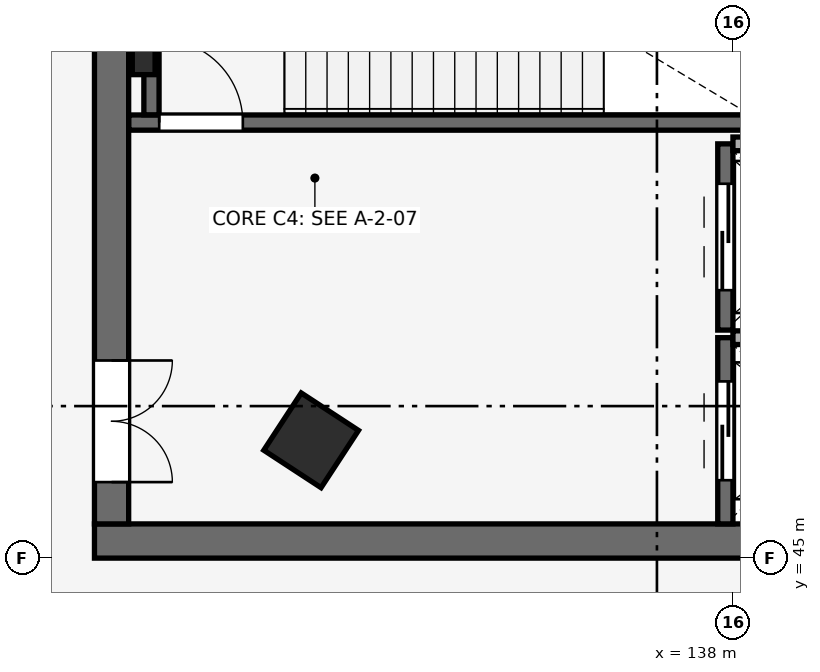
"""IFC4 building model, lengths in metres.
Left out: names, types, materials, properties, quantities, classifications, styles, units other than length and angle.
Written with IfcOpenShell. Run it as: python <this file> out.ifc"""

import sys

from ifc_helpers import new_model, si_unit, direction, frame, frame_2d, origin, origin_2d, place, context, subcontext, project, spatial, rectangle, i_section, extrude, element, fill, save


model = new_model("IFC4")
c1 = context("Model", 3, precision=1e-05, world=origin(), true_north=direction((0.0, 1.0)))
c2 = subcontext(c1, "Body", "Model", "MODEL_VIEW")
j1 = project(units=[si_unit("LENGTHUNIT", "METRE"), si_unit("PLANEANGLEUNIT", "RADIAN")], contexts=[c1])
p1 = place(None, origin())
s1 = spatial("IfcSite", under=j1, at=p1, CompositionType="ELEMENT")
p2 = place(p1, origin())
s2 = spatial("IfcBuilding", under=s1, at=p2, CompositionType="ELEMENT")
p3 = place(p2, origin())
s3 = spatial("IfcBuildingStorey", under=s2, at=p3, CompositionType="ELEMENT", Elevation=0.0)
p4 = place(p3, frame((132.451, 46.55, 0.0), z_axis=(0.0, 0.0, 1.0), x_axis=(0.836955398099, -0.547271104292, 0.0)))
e1 = element("IfcColumn", 1, at=p4, inside=s3, PredefinedType="COLUMN", context=c2, shape_type="SweptSolid", body=[
    extrude(rectangle(XDim=0.9, YDim=0.9, at=origin_2d()), origin(), (0.0, 0.0, 1.0), 5.4),
])
p5 = place(p3, frame((129.6, 45.225, 0.0), z_axis=(0.0, 0.0, 1.0), x_axis=(1.0, 0.0, 0.0)))
e2 = element("IfcWall", 2, at=p5, inside=s3, PredefinedType="SHEAR", context=c2, shape_type="SweptSolid", body=[
    extrude(rectangle(XDim=11.4, YDim=0.45, at=frame_2d((5.7, 0.0))), origin(), (0.0, 0.0, 1.0), 5.4),
])
p6 = place(p3, frame((129.825, 45.45, 0.0), z_axis=(0.0, 0.0, 1.0), x_axis=(0.0, 1.0, 0.0)))
e3 = element("IfcWall", 3, at=p6, inside=s3, PredefinedType="SHEAR", context=c2, shape_type="SweptSolid", body=[
    extrude(rectangle(XDim=9.1, YDim=0.45, at=frame_2d((4.55, 0.0))), origin(), (0.0, 0.0, 1.0), 5.4),
])
p7 = place(p6, frame((0.55, 0.0, 0.0)))
e4 = element("IfcOpeningElement", 4, at=p7, cuts=e3, PredefinedType="OPENING", context=c2, shape_type="SweptSolid", body=[
    extrude(rectangle(XDim=1.6, YDim=2.2, at=frame_2d((0.8, 1.1))), frame((0.0, 0.235, 0.0), z_axis=(0.0, -1.0, 0.0), x_axis=(1.0, 0.0, 0.0)), (0.0, 0.0, 1.0), 0.47),
])
p8 = place(p3, frame((130.248, 51.611, 0.0), z_axis=(0.0, 0.0, 1.0), x_axis=(1.0, 0.0, 0.0)))
e5 = element("IfcColumn", 5, at=p8, inside=s3, PredefinedType="COLUMN", context=c2, shape_type="SweptSolid", body=[
    extrude(i_section(OverallWidth=0.3, OverallDepth=0.5, WebThickness=0.014, FlangeThickness=0.028, FilletRadius=0.027, at=origin_2d()), origin(), (0.0, 0.0, 1.0), 5.4),
])
p9 = place(p3, frame((137.9, 45.45, 0.0), z_axis=(0.0, 0.0, 1.0), x_axis=(0.0, 1.0, 0.0)))
e6 = element("IfcWall", 6, at=p9, inside=s3, PredefinedType="SHEAR", context=c2, shape_type="SweptSolid", body=[
    extrude(rectangle(XDim=2.45, YDim=0.2, at=frame_2d((1.225, 0.0))), origin(), (0.0, 0.0, 1.0), 5.12),
])
p10 = place(p9, frame((0.575, 0.0, 0.0)))
e7 = element("IfcOpeningElement", 7, at=p10, cuts=e6, PredefinedType="OPENING", context=c2, shape_type="SweptSolid", body=[
    extrude(rectangle(XDim=1.3, YDim=2.2, at=frame_2d((0.65, 1.1))), frame((0.0, 0.11, 0.0), z_axis=(0.0, -1.0, 0.0), x_axis=(1.0, 0.0, 0.0)), (0.0, 0.0, 1.0), 0.22),
])
p11 = place(p3, frame((138.0, 47.9, 0.0), z_axis=(0.0, 0.0, 1.0), x_axis=(1.0, 0.0, 0.0)))
e8 = element("IfcWall", 8, at=p11, inside=s3, PredefinedType="PARTITIONING", context=c2, shape_type="SweptSolid", body=[
    extrude(rectangle(XDim=2.45, YDim=0.18, at=frame_2d((1.225, 0.0))), origin(), (0.0, 0.0, 1.0), 5.4),
])
p12 = place(p3, frame((137.9, 48.0, 0.0), z_axis=(0.0, 0.0, 1.0), x_axis=(0.0, 1.0, 0.0)))
e9 = element("IfcWall", 9, at=p12, inside=s3, PredefinedType="SHEAR", context=c2, shape_type="SweptSolid", body=[
    extrude(rectangle(XDim=2.45, YDim=0.2, at=frame_2d((1.225, 0.0))), origin(), (0.0, 0.0, 1.0), 5.12),
])
p13 = place(p12, frame((0.525, 0.0, 0.0)))
e10 = element("IfcOpeningElement", 10, at=p13, cuts=e9, PredefinedType="OPENING", context=c2, shape_type="SweptSolid", body=[
    extrude(rectangle(XDim=1.4, YDim=2.2, at=frame_2d((0.7, 1.1))), frame((0.0, 0.11, 0.0), z_axis=(0.0, -1.0, 0.0), x_axis=(1.0, 0.0, 0.0)), (0.0, 0.0, 1.0), 0.22),
])
p14 = place(p3, frame((138.0, 50.45, 0.0), z_axis=(0.0, 0.0, 1.0), x_axis=(1.0, 0.0, 0.0)))
e11 = element("IfcWall", 11, at=p14, inside=s3, PredefinedType="PARTITIONING", context=c2, shape_type="SweptSolid", body=[
    extrude(rectangle(XDim=2.45, YDim=0.18, at=frame_2d((1.225, 0.0))), origin(), (0.0, 0.0, 1.0), 5.4),
])
p15 = place(p3, frame((130.052, 50.73, 0.0), z_axis=(0.0, 0.0, 1.0), x_axis=(1.0, 0.0, 0.0)))
e12 = element("IfcWall", 12, at=p15, inside=s3, PredefinedType="SHEAR", context=c2, shape_type="SweptSolid", body=[
    extrude(rectangle(XDim=8.248, YDim=0.2, at=frame_2d((4.124, 0.0))), origin(), (0.0, 0.0, 1.0), 5.4),
])
p16 = place(p15, frame((0.4, 0.0, 0.0)))
e13 = element("IfcOpeningElement", 13, at=p16, cuts=e12, PredefinedType="OPENING", context=c2, shape_type="SweptSolid", body=[
    extrude(rectangle(XDim=1.1, YDim=2.15, at=frame_2d((0.55, 1.075))), frame((0.0, 0.11, 0.0), z_axis=(0.0, -1.0, 0.0), x_axis=(1.0, 0.0, 0.0)), (0.0, 0.0, 1.0), 0.22),
])
p17 = place(p3, frame((130.35, 50.832, 0.0), z_axis=(0.0, 0.0, 1.0), x_axis=(0.0, 1.0, 0.0)))
e14 = element("IfcWall", 14, at=p17, inside=s3, PredefinedType="SHEAR", context=c2, shape_type="SweptSolid", body=[
    extrude(rectangle(XDim=3.686, YDim=0.2, at=frame_2d((1.843, 0.0))), origin(), (0.0, 0.0, 1.0), 5.4),
])
p18 = place(p10, origin())
e15 = element("IfcDoor", 15, at=p18, inside=s3, OperationType="DOUBLE_DOOR_SLIDING", PredefinedType="DOOR", context=c2, shape_type="SweptSolid", body=[
    extrude(rectangle(XDim=1.3, YDim=2.2, at=frame_2d((0.65, 1.1))), frame((0.0, 0.025, 0.0), z_axis=(0.0, -1.0, 0.0), x_axis=(1.0, 0.0, 0.0)), (0.0, 0.0, 1.0), 0.05),
])
fill(e7, e15)
p19 = place(p13, origin())
e16 = element("IfcDoor", 16, at=p19, inside=s3, OperationType="DOUBLE_DOOR_SLIDING", PredefinedType="DOOR", context=c2, shape_type="SweptSolid", body=[
    extrude(rectangle(XDim=1.4, YDim=2.2, at=frame_2d((0.7, 1.1))), frame((0.0, 0.025, 0.0), z_axis=(0.0, -1.0, 0.0), x_axis=(1.0, 0.0, 0.0)), (0.0, 0.0, 1.0), 0.05),
])
fill(e10, e16)
p20 = place(p16, frame((1.1, 0.0, 0.0), z_axis=(0.0, 0.0, 1.0), x_axis=(-1.0, 0.0, 0.0)))
e17 = element("IfcDoor", 17, at=p20, inside=s3, OperationType="SINGLE_SWING_RIGHT", PredefinedType="DOOR", context=c2, shape_type="SweptSolid", body=[
    extrude(rectangle(XDim=1.1, YDim=2.15, at=frame_2d((0.55, 1.075))), frame((0.0, 0.025, 0.0), z_axis=(0.0, -1.0, 0.0), x_axis=(1.0, 0.0, 0.0)), (0.0, 0.0, 1.0), 0.05),
])
fill(e13, e17)
p21 = place(p7, frame((1.6, 0.0, 0.0), z_axis=(0.0, 0.0, 1.0), x_axis=(-1.0, 0.0, 0.0)))
e18 = element("IfcDoor", 18, at=p21, inside=s3, OperationType="DOUBLE_DOOR_SINGLE_SWING", PredefinedType="DOOR", context=c2, shape_type="SweptSolid", body=[
    extrude(rectangle(XDim=1.6, YDim=2.2, at=frame_2d((0.8, 1.1))), frame((0.0, 0.025, 0.0), z_axis=(0.0, -1.0, 0.0), x_axis=(1.0, 0.0, 0.0)), (0.0, 0.0, 1.0), 0.05),
])
fill(e4, e18)
save(model, sys.argv[1])
